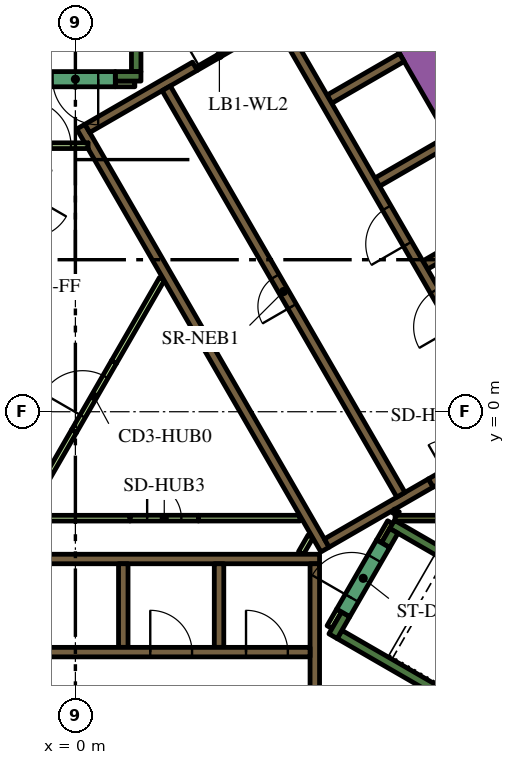
"""IFC4 building model, lengths in metres.
Left out: names, types, materials, properties, quantities, classifications, styles, units other than length and angle.
Written with IfcOpenShell. Run it as: python <this file> out.ifc"""

import sys

from ifc_helpers import new_model, si_unit, direction, frame, frame_2d, origin, place, context, subcontext, project, spatial, polyline, rectangle, outline, extrude, element, fill, save


model = new_model("IFC4")
c1 = context("Model", 3, precision=1e-05, world=origin(), true_north=direction((0.0, 1.0)))
c2 = subcontext(c1, "Body", "Model", "MODEL_VIEW")
j1 = project(units=[si_unit("LENGTHUNIT", "METRE"), si_unit("PLANEANGLEUNIT", "RADIAN")], contexts=[c1])
p1 = place(None, origin())
s1 = spatial("IfcSite", under=j1, at=p1, CompositionType="ELEMENT")
p2 = place(p1, origin())
s2 = spatial("IfcBuilding", under=s1, at=p2, CompositionType="ELEMENT")
p3 = place(p2, frame((0.0, 0.0, 130.5)))
s3 = spatial("IfcBuildingStorey", under=s2, at=p3, CompositionType="ELEMENT", Elevation=130.5)
p4 = place(p3, frame((6.776, 13.364, 0.0), z_axis=(0.0, 0.0, 1.0), x_axis=(0.500004177138, -0.8660229921, 0.0)))
e1 = element("IfcWall", 1, at=p4, inside=s3, PredefinedType="SOLIDWALL", context=c2, shape_type="SweptSolid", body=[
    extrude(rectangle(XDim=20.204, YDim=0.9, at=frame_2d((10.102, 0.0))), origin(), (0.0, 0.0, 1.0), 3.9),
])
p5 = place(p3, frame((12.84, -9.261, 0.0), z_axis=(0.0, 0.0, 1.0), x_axis=(-0.866013990052, 0.500019768644, 0.0)))
e2 = element("IfcWall", 2, at=p5, inside=s3, PredefinedType="SOLIDWALL", context=c2, shape_type="SweptSolid", body=[
    extrude(rectangle(XDim=6.8, YDim=0.25, at=frame_2d((3.4, 0.0))), origin(), (0.0, 0.0, 1.0), 3.9),
])
p6 = place(p3, frame((7.113, -5.33, 0.0), z_axis=(0.0, 0.0, 1.0), x_axis=(-0.499965889992, -0.866045096311, 0.0)))
e3 = element("IfcWall", 3, at=p6, inside=s3, PredefinedType="SOLIDWALL", context=c2, shape_type="SweptSolid", body=[
    extrude(rectangle(XDim=0.666, YDim=0.25, at=frame_2d((0.333, 0.0))), origin(), (0.0, 0.0, 1.0), 3.9),
])
p7 = place(p3, frame((8.334, -2.964, 0.0), z_axis=(0.0, 0.0, 1.0), x_axis=(0.866016039709, -0.500016218704, 0.0)))
e4 = element("IfcWall", 4, at=p7, inside=s3, PredefinedType="SOLIDWALL", context=c2, shape_type="SweptSolid", body=[
    extrude(rectangle(XDim=7.05, YDim=0.25, at=frame_2d((3.525, 0.0))), origin(), (0.0, 0.0, 1.0), 3.9),
])
p8 = place(p3, frame((8.163, -3.511, 0.0), z_axis=(0.0, 0.0, 1.0), x_axis=(0.500127794843, 0.865951608824, 0.0)))
e5 = element("IfcWall", 5, at=p8, inside=s3, PredefinedType="SOLIDWALL", context=c2, shape_type="SweptSolid", body=[
    extrude(rectangle(XDim=0.435, YDim=0.25, at=frame_2d((0.217, 0.0))), origin(), (0.0, 0.0, 1.0), 3.9),
])
p9 = place(p3, frame((1.6, 8.95, 0.0), z_axis=(0.0, 0.0, 1.0), x_axis=(0.0, 1.0, 0.0)))
e6 = element("IfcWall", 6, at=p9, inside=s3, PredefinedType="SOLIDWALL", context=c2, shape_type="SweptSolid", body=[
    extrude(rectangle(XDim=6.8, YDim=0.25, at=frame_2d((3.4, 0.0))), origin(), (0.0, 0.0, 1.0), 3.9),
])
p10 = place(p3, frame((1.05, 8.825, 0.0), z_axis=(0.0, 0.0, 1.0), x_axis=(1.0, 0.0, 0.0)))
e7 = element("IfcWall", 7, at=p10, inside=s3, PredefinedType="SOLIDWALL", context=c2, shape_type="SweptSolid", body=[
    extrude(rectangle(XDim=0.675, YDim=0.25, at=frame_2d((0.337, 0.0))), origin(), (0.0, 0.0, 1.0), 3.9),
])
p11 = place(p3, frame((-6.19, -3.875, 0.0), z_axis=(0.0, 0.0, 1.0), x_axis=(1.0, 0.0, 0.0)))
e8 = element("IfcWall", 8, at=p11, inside=s3, PredefinedType="SOLIDWALL", context=c2, shape_type="SweptSolid", body=[
    extrude(rectangle(XDim=12.615, YDim=0.25, at=frame_2d((6.307, 0.0))), origin(), (0.0, 0.0, 1.0), 3.9),
])
p12 = place(p3, frame((6.3, -7.268, 0.0), z_axis=(0.0, 0.0, 1.0), x_axis=(0.0, 1.0, 0.0)))
e9 = element("IfcWall", 9, at=p12, inside=s3, PredefinedType="SOLIDWALL", context=c2, shape_type="SweptSolid", body=[
    extrude(rectangle(XDim=3.268, YDim=0.25, at=frame_2d((1.634, 0.0))), origin(), (0.0, 0.0, 1.0), 3.9),
])
for number, where, z_axis, x_axis in (
    (10, (3.78, -4.0, 0.0), (0.0, 0.0, 1.0), (0.0, -1.0, 0.0)),
    (11, (1.26, -4.0, 0.0), (0.0, 0.0, 1.0), (0.0, -1.0, 0.0)),
):
    element("IfcWall", number, at=place(p3, frame(where, z_axis=z_axis, x_axis=x_axis)), inside=s3, PredefinedType="SOLIDWALL", context=c2, shape_type="SweptSolid", body=[
        extrude(rectangle(XDim=2.2, YDim=0.25, at=frame_2d((1.1, 0.0))), origin(), (0.0, 0.0, 1.0), 3.9),
    ])
p13 = place(p3, origin())
e12 = element("IfcWall", 12, at=p13, inside=s3, PredefinedType="SOLIDWALL", context=c2, shape_type="SweptSolid", body=[
    extrude(outline(polyline([(0.335, 6.925), (0.335, 7.075), (0.335, 7.075), (0.335, 7.075), (0.245, 7.075), (0.035, 7.439), (0.252, 7.564), (0.377, 7.348), (1.512, 5.382), (1.637, 5.165), (2.221, 4.153), (2.771, 3.199), (2.896, 2.983), (3.138, 2.564), (4.031, 1.017), (4.156, 0.801), (5.292, -1.165), (5.417, -1.382), (6.073, -2.519), (6.552, -3.348), (6.677, -3.564), (6.46, -3.689), (0.332, 6.925), (0.335, 6.925), (0.335, 6.925), (0.335, 6.925)])), origin(), (0.0, 0.0, 1.0), 3.9),
])
p14 = place(p3, frame((0.314, 7.456, 0.0), z_axis=(0.0, 0.0, 1.0), x_axis=(0.866013897511, 0.50001992892, 0.0)))
e13 = element("IfcWall", 13, at=p14, inside=s3, PredefinedType="SOLIDWALL", context=c2, shape_type="SweptSolid", body=[
    extrude(rectangle(XDim=3.268, YDim=0.25, at=frame_2d((1.634, 0.0))), origin(), (0.0, 0.0, 1.0), 3.9),
])
p15 = place(p3, frame((9.352, -1.875, 0.0), z_axis=(0.0, 0.0, 1.0), x_axis=(-0.866024844342, -0.500000968981, 0.0)))
e14 = element("IfcWall", 14, at=p15, inside=s3, PredefinedType="SOLIDWALL", context=c2, shape_type="SweptSolid", body=[
    extrude(rectangle(XDim=3.162, YDim=0.25, at=frame_2d((1.581, 0.0))), origin(), (0.0, 0.0, 1.0), 3.9),
])
for number, where, z_axis, x_axis in (
    (15, (6.684, 8.224, 0.0), (0.0, 0.0, 1.0), (0.866, 0.5, 0.0)),
    (16, (7.944, 6.041, 0.0), (0.0, 0.0, 1.0), (0.866, 0.5, 0.0)),
    (17, (9.204, 3.859, 0.0), (0.0, 0.0, 1.0), (0.866, 0.5, 0.0)),
):
    element("IfcWall", number, at=place(p3, frame(where, z_axis=z_axis, x_axis=x_axis)), inside=s3, PredefinedType="SOLIDWALL", context=c2, shape_type="SweptSolid", body=[
        extrude(rectangle(XDim=2.2, YDim=0.25, at=frame_2d((1.1, 0.0))), origin(), (0.0, 0.0, 1.0), 3.9),
    ])
p16 = place(p3, frame((-6.086, -2.801, 0.0), z_axis=(0.0, 0.0, 1.0), x_axis=(1.0, 0.0, 0.0)))
e18 = element("IfcWall", 18, at=p16, inside=s3, PredefinedType="PARTITIONING", context=c2, shape_type="SweptSolid", body=[
    extrude(rectangle(XDim=7.524, YDim=0.15, at=frame_2d((3.762, 0.0))), origin(), (0.0, 0.0, 1.0), 2.6),
])
p17 = place(p3, frame((-1.208, -2.544, 0.0), z_axis=(0.0, 0.0, 1.0), x_axis=(0.499995339376, 0.86602809458, 0.0)))
e19 = element("IfcWall", 19, at=p17, inside=s3, PredefinedType="PARTITIONING", context=c2, shape_type="SweptSolid", body=[
    extrude(rectangle(XDim=2.349, YDim=0.15, at=frame_2d((1.175, 0.0))), origin(), (0.0, 0.0, 1.0), 2.6),
])
p18 = place(p3, frame((6.688, -5.667, 0.0), z_axis=(0.0, 0.0, 1.0), x_axis=(0.499834152157, 0.86612113491, 0.0)))
e20 = element("IfcWall", 20, at=p18, inside=s3, PredefinedType="PARTITIONING", context=c2, shape_type="SweptSolid", body=[
    extrude(rectangle(XDim=0.505, YDim=0.15, at=frame_2d((0.252, 0.0))), origin(), (0.0, 0.0, 1.0), 2.6),
])
p19 = place(p3, frame((5.936, -3.718, 0.0), z_axis=(0.0, 0.0, 1.0), x_axis=(0.499890179513, 0.866088799389, 0.0)))
e21 = element("IfcWall", 21, at=p19, inside=s3, PredefinedType="PARTITIONING", context=c2, shape_type="SweptSolid", body=[
    extrude(rectangle(XDim=0.504, YDim=0.15, at=frame_2d((0.252, 0.0))), origin(), (0.0, 0.0, 1.0), 2.6),
])
p20 = place(p3, frame((8.412, -2.8, 0.0), z_axis=(0.0, 0.0, 1.0), x_axis=(1.0, 0.0, 0.0)))
e22 = element("IfcWall", 22, at=p20, inside=s3, PredefinedType="PARTITIONING", context=c2, shape_type="SweptSolid", body=[
    extrude(rectangle(XDim=2.702, YDim=0.15, at=frame_2d((1.351, 0.0))), origin(), (0.0, 0.0, 1.0), 3.9),
])
p21 = place(p3, frame((8.459, -2.599, 0.0), z_axis=(0.0, 0.0, 1.0), x_axis=(-0.501919277433, -0.864914469148, 0.0)))
e23 = element("IfcWall", 23, at=p21, inside=s3, PredefinedType="PARTITIONING", context=c2, shape_type="SweptSolid", body=[
    extrude(rectangle(XDim=0.109, YDim=0.15, at=frame_2d((0.054, 0.0))), origin(), (0.0, 0.0, 1.0), 3.9),
])
p22 = place(p3, frame((8.281, -2.907, 0.0), z_axis=(0.0, 0.0, 1.0), x_axis=(-0.500193841991, -0.86591346013, 0.0)))
e24 = element("IfcWall", 24, at=p22, inside=s3, PredefinedType="PARTITIONING", context=c2, shape_type="SweptSolid", body=[
    extrude(rectangle(XDim=0.583, YDim=0.15, at=frame_2d((0.292, 0.0))), origin(), (0.0, 0.0, 1.0), 3.9),
])
p23 = place(p3, frame((3.238, -2.8, 0.0), z_axis=(0.0, 0.0, 1.0), x_axis=(1.0, 0.0, 0.0)))
e25 = element("IfcWall", 25, at=p23, inside=s3, PredefinedType="PARTITIONING", context=c2, shape_type="SweptSolid", body=[
    extrude(rectangle(XDim=2.672, YDim=0.15, at=frame_2d((1.336, 0.0))), origin(), (0.0, 0.0, 1.0), 2.6),
])
p24 = place(p3, frame((1.016, 1.309, 0.0), z_axis=(0.0, 0.0, 1.0), x_axis=(0.49998231768, 0.866035612436, 0.0)))
e26 = element("IfcWall", 26, at=p24, inside=s3, PredefinedType="PARTITIONING", context=c2, shape_type="SweptSolid", body=[
    extrude(rectangle(XDim=2.521, YDim=0.15, at=frame_2d((1.26, 0.0))), origin(), (0.0, 0.0, 1.0), 2.6),
])
p25 = place(p3, frame((1.05, 8.625, 0.0), z_axis=(0.0, 0.0, 1.0), x_axis=(1.0, 0.0, 0.0)))
e27 = element("IfcWall", 27, at=p25, inside=s3, PredefinedType="PARTITIONING", context=c2, shape_type="SweptSolid", body=[
    extrude(rectangle(XDim=0.514, YDim=0.15, at=frame_2d((0.257, 0.0))), origin(), (0.0, 0.0, 1.0), 2.6),
])
p26 = place(p3, frame((-6.175, -6.325, 0.0), z_axis=(0.0, 0.0, 1.0), x_axis=(1.0, 0.0, 0.0)))
e28 = element("IfcWall", 28, at=p26, inside=s3, PredefinedType="SOLIDWALL", context=c2, shape_type="SweptSolid", body=[
    extrude(rectangle(XDim=12.35, YDim=0.25, at=frame_2d((6.175, 0.0))), origin(), (0.0, 0.0, 1.0), 3.9),
])
p27 = place(p26, frame((3.205, 0.0, 0.0)))
e29 = element("IfcOpeningElement", 29, at=p27, cuts=e28, PredefinedType="OPENING", context=c2, shape_type="SweptSolid", body=[
    extrude(rectangle(XDim=0.9, YDim=2.1, at=frame_2d((0.45, 1.05))), frame((0.0, 0.135, 0.0), z_axis=(0.0, -1.0, 0.0), x_axis=(1.0, 0.0, 0.0)), (0.0, 0.0, 1.0), 0.27),
])
p28 = place(p26, frame((8.145, 0.0, 0.0)))
e30 = element("IfcOpeningElement", 30, at=p28, cuts=e28, PredefinedType="OPENING", context=c2, shape_type="SweptSolid", body=[
    extrude(rectangle(XDim=1.1, YDim=2.1, at=frame_2d((0.55, 1.05))), frame((0.0, 0.135, 0.0), z_axis=(0.0, -1.0, 0.0), x_axis=(1.0, 0.0, 0.0)), (0.0, 0.0, 1.0), 0.27),
])
p29 = place(p26, frame((10.665, 0.0, 0.0)))
e31 = element("IfcOpeningElement", 31, at=p29, cuts=e28, PredefinedType="OPENING", context=c2, shape_type="SweptSolid", body=[
    extrude(rectangle(XDim=1.1, YDim=2.1, at=frame_2d((0.55, 1.05))), frame((0.0, 0.135, 0.0), z_axis=(0.0, -1.0, 0.0), x_axis=(1.0, 0.0, 0.0)), (0.0, 0.0, 1.0), 0.27),
])
p30 = place(p3, frame((11.553, -0.46, 0.0), z_axis=(0.0, 0.0, 1.0), x_axis=(-0.500006514828, 0.866021642414, 0.0)))
e32 = element("IfcWall", 32, at=p30, inside=s3, PredefinedType="SOLIDWALL", context=c2, shape_type="SweptSolid", body=[
    extrude(rectangle(XDim=12.35, YDim=0.25, at=frame_2d((6.175, 0.0))), origin(), (0.0, 0.0, 1.0), 3.9),
])
p31 = place(p30, frame((0.585, 0.0, 0.0)))
e33 = element("IfcOpeningElement", 33, at=p31, cuts=e32, PredefinedType="OPENING", context=c2, shape_type="SweptSolid", body=[
    extrude(rectangle(XDim=1.1, YDim=2.1, at=frame_2d((0.55, 1.05))), frame((0.0, 0.135, 0.0), z_axis=(0.0, -1.0, 0.0), x_axis=(1.0, 0.0, 0.0)), (0.0, 0.0, 1.0), 0.27),
])
p32 = place(p30, frame((3.105, 0.0, 0.0)))
e34 = element("IfcOpeningElement", 34, at=p32, cuts=e32, PredefinedType="OPENING", context=c2, shape_type="SweptSolid", body=[
    extrude(rectangle(XDim=1.1, YDim=2.1, at=frame_2d((0.55, 1.05))), frame((0.0, 0.135, 0.0), z_axis=(0.0, -1.0, 0.0), x_axis=(1.0, 0.0, 0.0)), (0.0, 0.0, 1.0), 0.27),
])
p33 = place(p30, frame((5.625, 0.0, 0.0)))
e35 = element("IfcOpeningElement", 35, at=p33, cuts=e32, PredefinedType="OPENING", context=c2, shape_type="SweptSolid", body=[
    extrude(rectangle(XDim=1.1, YDim=2.1, at=frame_2d((0.55, 1.05))), frame((0.0, 0.135, 0.0), z_axis=(0.0, -1.0, 0.0), x_axis=(1.0, 0.0, 0.0)), (0.0, 0.0, 1.0), 0.27),
])
p34 = place(p3, frame((8.565, -2.185, 0.0), z_axis=(0.0, 0.0, 1.0), x_axis=(-0.499997954832, 0.866026584559, 0.0)))
e36 = element("IfcWall", 36, at=p34, inside=s3, PredefinedType="SOLIDWALL", context=c2, shape_type="SweptSolid", body=[
    extrude(rectangle(XDim=12.35, YDim=0.25, at=frame_2d((6.175, 0.0))), origin(), (0.0, 0.0, 1.0), 3.9),
])
p35 = place(p34, frame((5.725, 0.0, 0.0)))
e37 = element("IfcOpeningElement", 37, at=p35, cuts=e36, PredefinedType="OPENING", context=c2, shape_type="SweptSolid", body=[
    extrude(rectangle(XDim=0.9, YDim=2.1, at=frame_2d((0.45, 1.05))), frame((0.0, 0.135, 0.0), z_axis=(0.0, -1.0, 0.0), x_axis=(1.0, 0.0, 0.0)), (0.0, 0.0, 1.0), 0.27),
])
p36 = place(p3, frame((7.048, -5.292, 0.0), z_axis=(0.0, 0.0, 1.0), x_axis=(0.49994051562, 0.866059744384, 0.0)))
e38 = element("IfcWall", 38, at=p36, inside=s3, PredefinedType="SOLIDWALL", context=c2, shape_type="SweptSolid", body=[
    extrude(rectangle(XDim=2.1, YDim=0.4, at=frame_2d((1.05, 0.0))), origin(), (0.0, 0.0, 1.0), 3.9),
])
p37 = place(p36, frame((0.45, 0.0, 0.0)))
e39 = element("IfcOpeningElement", 39, at=p37, cuts=e38, PredefinedType="OPENING", context=c2, shape_type="SweptSolid", body=[
    extrude(rectangle(XDim=1.2, YDim=2.1, at=frame_2d((0.6, 1.05))), frame((0.0, 0.21, 0.0), z_axis=(0.0, -1.0, 0.0), x_axis=(1.0, 0.0, 0.0)), (0.0, 0.0, 1.0), 0.42),
])
p38 = place(p3, frame((1.05, 8.75, 0.0), z_axis=(0.0, 0.0, 1.0), x_axis=(-1.0, 0.0, 0.0)))
e40 = element("IfcWall", 40, at=p38, inside=s3, PredefinedType="SOLIDWALL", context=c2, shape_type="SweptSolid", body=[
    extrude(rectangle(XDim=2.1, YDim=0.4, at=frame_2d((1.05, 0.0))), origin(), (0.0, 0.0, 1.0), 3.9),
])
p39 = place(p38, frame((0.45, 0.0, 0.0)))
e41 = element("IfcOpeningElement", 41, at=p39, cuts=e40, PredefinedType="OPENING", context=c2, shape_type="SweptSolid", body=[
    extrude(rectangle(XDim=1.2, YDim=2.1, at=frame_2d((0.6, 1.05))), frame((0.0, 0.21, 0.0), z_axis=(0.0, -1.0, 0.0), x_axis=(1.0, 0.0, 0.0)), (0.0, 0.0, 1.0), 0.42),
])
p40 = place(p3, frame((-1.765, 7.0, 0.0), z_axis=(0.0, 0.0, 1.0), x_axis=(1.0, 0.0, 0.0)))
e42 = element("IfcWall", 42, at=p40, inside=s3, PredefinedType="PARTITIONING", context=c2, shape_type="SweptSolid", body=[
    extrude(rectangle(XDim=2.1, YDim=0.15, at=frame_2d((1.05, 0.0))), origin(), (0.0, 0.0, 1.0), 2.6),
])
p41 = place(p40, frame((0.45, 0.0, 0.0)))
e43 = element("IfcOpeningElement", 43, at=p41, cuts=e42, PredefinedType="OPENING", context=c2, shape_type="SweptSolid", body=[
    extrude(rectangle(XDim=1.2, YDim=2.1, at=frame_2d((0.6, 1.05))), frame((0.0, 0.085, 0.0), z_axis=(0.0, -1.0, 0.0), x_axis=(1.0, 0.0, 0.0)), (0.0, 0.0, 1.0), 0.17),
])
p42 = place(p3, frame((-0.034, -0.509, 0.0), z_axis=(0.0, 0.0, 1.0), x_axis=(0.49994051562, 0.866059744384, 0.0)))
e44 = element("IfcWall", 44, at=p42, inside=s3, PredefinedType="PARTITIONING", context=c2, shape_type="SweptSolid", body=[
    extrude(rectangle(XDim=2.1, YDim=0.15, at=frame_2d((1.05, 0.0))), origin(), (0.0, 0.0, 1.0), 2.6),
])
p43 = place(p42, frame((0.45, 0.0, 0.0)))
e45 = element("IfcOpeningElement", 45, at=p43, cuts=e44, PredefinedType="OPENING", context=c2, shape_type="SweptSolid", body=[
    extrude(rectangle(XDim=1.2, YDim=2.1, at=frame_2d((0.6, 1.05))), frame((0.0, 0.085, 0.0), z_axis=(0.0, -1.0, 0.0), x_axis=(1.0, 0.0, 0.0)), (0.0, 0.0, 1.0), 0.17),
])
p44 = place(p3, frame((3.183, 9.02, 0.0), z_axis=(0.0, 0.0, 1.0), x_axis=(0.866034573852, 0.49998411664, 0.0)))
e46 = element("IfcWall", 46, at=p44, inside=s3, PredefinedType="PARTITIONING", context=c2, shape_type="SweptSolid", body=[
    extrude(rectangle(XDim=1.4, YDim=0.09, at=frame_2d((0.7, 0.0))), origin(), (0.0, 0.0, 1.0), 2.6),
])
p45 = place(p44, frame((0.1, 0.0, 0.0)))
e47 = element("IfcOpeningElement", 47, at=p45, cuts=e46, PredefinedType="OPENING", context=c2, shape_type="SweptSolid", body=[
    extrude(rectangle(XDim=1.2, YDim=2.1, at=frame_2d((0.6, 1.05))), frame((0.0, 0.055, 0.0), z_axis=(0.0, -1.0, 0.0), x_axis=(1.0, 0.0, 0.0)), (0.0, 0.0, 1.0), 0.11),
])
p46 = place(p3, frame((9.352, -1.875, 0.0), z_axis=(0.0, 0.0, 1.0), x_axis=(0.865989075817, 0.500062916607, 0.0)))
e48 = element("IfcWall", 48, at=p46, inside=s3, PredefinedType="SOLIDWALL", context=c2, shape_type="SweptSolid", body=[
    extrude(rectangle(XDim=1.8, YDim=0.25, at=frame_2d((0.9, 0.0))), origin(), (0.0, 0.0, 1.0), 3.9),
])
p47 = place(p46, frame((0.45, 0.0, 0.0)))
e49 = element("IfcOpeningElement", 49, at=p47, cuts=e48, PredefinedType="OPENING", context=c2, shape_type="SweptSolid", body=[
    extrude(rectangle(XDim=0.9, YDim=2.1, at=frame_2d((0.45, 1.05))), frame((0.0, 0.135, 0.0), z_axis=(0.0, -1.0, 0.0), x_axis=(1.0, 0.0, 0.0)), (0.0, 0.0, 1.0), 0.27),
])
p48 = place(p3, frame((1.438, -2.8, 0.0), z_axis=(0.0, 0.0, 1.0), x_axis=(1.0, 0.0, 0.0)))
e50 = element("IfcWall", 50, at=p48, inside=s3, PredefinedType="PARTITIONING", context=c2, shape_type="SweptSolid", body=[
    extrude(rectangle(XDim=1.8, YDim=0.15, at=frame_2d((0.9, 0.0))), origin(), (0.0, 0.0, 1.0), 2.6),
])
p49 = place(p48, frame((0.45, 0.0, 0.0)))
e51 = element("IfcOpeningElement", 51, at=p49, cuts=e50, PredefinedType="OPENING", context=c2, shape_type="SweptSolid", body=[
    extrude(rectangle(XDim=0.9, YDim=2.1, at=frame_2d((0.45, 1.05))), frame((0.0, 0.085, 0.0), z_axis=(0.0, -1.0, 0.0), x_axis=(1.0, 0.0, 0.0)), (0.0, 0.0, 1.0), 0.17),
])
p50 = place(p3, frame((6.163, 18.475, 0.0), z_axis=(0.0, 0.0, 1.0), x_axis=(0.500001317485, -0.866024643133, 0.0)))
e52 = element("IfcWall", 52, at=p50, inside=s3, PredefinedType="PARTITIONING", context=c2, shape_type="SweptSolid", body=[
    extrude(rectangle(XDim=25.767, YDim=0.15, at=frame_2d((12.883, 0.0))), origin(), (0.0, 0.0, 1.0), 2.6),
])
p51 = place(p50, frame((21.774, 0.0, 0.0)))
e53 = element("IfcOpeningElement", 53, at=p51, cuts=e52, PredefinedType="OPENING", context=c2, shape_type="SweptSolid", body=[
    extrude(rectangle(XDim=1.0, YDim=2.1, at=frame_2d((0.5, 1.05))), frame((0.0, 0.085, 0.0), z_axis=(0.0, -1.0, 0.0), x_axis=(1.0, 0.0, 0.0)), (0.0, 0.0, 1.0), 0.17),
])
p52 = place(p50, frame((15.571, 0.0, 0.0)))
e54 = element("IfcOpeningElement", 54, at=p52, cuts=e52, PredefinedType="OPENING", context=c2, shape_type="SweptSolid", body=[
    extrude(rectangle(XDim=1.0, YDim=2.1, at=frame_2d((0.5, 1.05))), frame((0.0, 0.085, 0.0), z_axis=(0.0, -1.0, 0.0), x_axis=(1.0, 0.0, 0.0)), (0.0, 0.0, 1.0), 0.17),
])
p53 = place(p50, frame((9.265, 0.0, 0.0)))
e55 = element("IfcOpeningElement", 55, at=p53, cuts=e52, PredefinedType="OPENING", context=c2, shape_type="SweptSolid", body=[
    extrude(rectangle(XDim=1.0, YDim=2.1, at=frame_2d((0.5, 1.05))), frame((0.0, 0.085, 0.0), z_axis=(0.0, -1.0, 0.0), x_axis=(1.0, 0.0, 0.0)), (0.0, 0.0, 1.0), 0.17),
])
p54 = place(p50, frame((3.063, 0.0, 0.0)))
e56 = element("IfcOpeningElement", 56, at=p54, cuts=e52, PredefinedType="OPENING", context=c2, shape_type="SweptSolid", body=[
    extrude(rectangle(XDim=1.0, YDim=2.1, at=frame_2d((0.5, 1.05))), frame((0.0, 0.085, 0.0), z_axis=(0.0, -1.0, 0.0), x_axis=(1.0, 0.0, 0.0)), (0.0, 0.0, 1.0), 0.17),
])
p55 = place(p28, origin())
e57 = element("IfcDoor", 57, at=p55, inside=s3, OperationType="DOUBLE_DOOR_SLIDING", PredefinedType="DOOR", context=c2, shape_type="SweptSolid", body=[
    extrude(rectangle(XDim=1.1, YDim=2.1, at=frame_2d((0.55, 1.05))), frame((0.0, 0.025, 0.0), z_axis=(0.0, -1.0, 0.0), x_axis=(1.0, 0.0, 0.0)), (0.0, 0.0, 1.0), 0.05),
])
fill(e30, e57)
p56 = place(p29, origin())
e58 = element("IfcDoor", 58, at=p56, inside=s3, OperationType="DOUBLE_DOOR_SLIDING", PredefinedType="DOOR", context=c2, shape_type="SweptSolid", body=[
    extrude(rectangle(XDim=1.1, YDim=2.1, at=frame_2d((0.55, 1.05))), frame((0.0, 0.025, 0.0), z_axis=(0.0, -1.0, 0.0), x_axis=(1.0, 0.0, 0.0)), (0.0, 0.0, 1.0), 0.05),
])
fill(e31, e58)
p57 = place(p32, origin())
e59 = element("IfcDoor", 59, at=p57, inside=s3, OperationType="DOUBLE_DOOR_SLIDING", PredefinedType="DOOR", context=c2, shape_type="SweptSolid", body=[
    extrude(rectangle(XDim=1.1, YDim=2.1, at=frame_2d((0.55, 1.05))), frame((0.0, 0.025, 0.0), z_axis=(0.0, -1.0, 0.0), x_axis=(1.0, 0.0, 0.0)), (0.0, 0.0, 1.0), 0.05),
])
fill(e34, e59)
p58 = place(p33, origin())
e60 = element("IfcDoor", 60, at=p58, inside=s3, OperationType="DOUBLE_DOOR_SLIDING", PredefinedType="DOOR", context=c2, shape_type="SweptSolid", body=[
    extrude(rectangle(XDim=1.1, YDim=2.1, at=frame_2d((0.55, 1.05))), frame((0.0, 0.025, 0.0), z_axis=(0.0, -1.0, 0.0), x_axis=(1.0, 0.0, 0.0)), (0.0, 0.0, 1.0), 0.05),
])
fill(e35, e60)
p59 = place(p35, origin())
e61 = element("IfcDoor", 61, at=p59, inside=s3, OperationType="SINGLE_SWING_LEFT", PredefinedType="DOOR", context=c2, shape_type="SweptSolid", body=[
    extrude(rectangle(XDim=0.9, YDim=2.1, at=frame_2d((0.45, 1.05))), frame((0.0, 0.025, 0.0), z_axis=(0.0, -1.0, 0.0), x_axis=(1.0, 0.0, 0.0)), (0.0, 0.0, 1.0), 0.05),
])
fill(e37, e61)
p60 = place(p37, origin())
e62 = element("IfcDoor", 62, at=p60, inside=s3, OperationType="SINGLE_SWING_LEFT", PredefinedType="DOOR", context=c2, shape_type="SweptSolid", body=[
    extrude(rectangle(XDim=1.2, YDim=2.1, at=frame_2d((0.6, 1.05))), frame((0.0, 0.025, 0.0), z_axis=(0.0, -1.0, 0.0), x_axis=(1.0, 0.0, 0.0)), (0.0, 0.0, 1.0), 0.05),
])
fill(e39, e62)
p61 = place(p39, origin())
e63 = element("IfcDoor", 63, at=p61, inside=s3, OperationType="SINGLE_SWING_LEFT", PredefinedType="DOOR", context=c2, shape_type="SweptSolid", body=[
    extrude(rectangle(XDim=1.2, YDim=2.1, at=frame_2d((0.6, 1.05))), frame((0.0, 0.025, 0.0), z_axis=(0.0, -1.0, 0.0), x_axis=(1.0, 0.0, 0.0)), (0.0, 0.0, 1.0), 0.05),
])
fill(e41, e63)
p62 = place(p41, origin())
e64 = element("IfcDoor", 64, at=p62, inside=s3, OperationType="SINGLE_SWING_LEFT", PredefinedType="DOOR", context=c2, shape_type="SweptSolid", body=[
    extrude(rectangle(XDim=1.2, YDim=2.1, at=frame_2d((0.6, 1.05))), frame((0.0, 0.025, 0.0), z_axis=(0.0, -1.0, 0.0), x_axis=(1.0, 0.0, 0.0)), (0.0, 0.0, 1.0), 0.05),
])
fill(e43, e64)
p63 = place(p43, origin())
e65 = element("IfcDoor", 65, at=p63, inside=s3, OperationType="SINGLE_SWING_LEFT", PredefinedType="DOOR", context=c2, shape_type="SweptSolid", body=[
    extrude(rectangle(XDim=1.2, YDim=2.1, at=frame_2d((0.6, 1.05))), frame((0.0, 0.025, 0.0), z_axis=(0.0, -1.0, 0.0), x_axis=(1.0, 0.0, 0.0)), (0.0, 0.0, 1.0), 0.05),
])
fill(e45, e65)
p64 = place(p45, origin())
e66 = element("IfcDoor", 66, at=p64, inside=s3, OperationType="SINGLE_SWING_LEFT", PredefinedType="DOOR", context=c2, shape_type="SweptSolid", body=[
    extrude(rectangle(XDim=1.2, YDim=2.1, at=frame_2d((0.6, 1.05))), frame((0.0, 0.025, 0.0), z_axis=(0.0, -1.0, 0.0), x_axis=(1.0, 0.0, 0.0)), (0.0, 0.0, 1.0), 0.05),
])
fill(e47, e66)
p65 = place(p49, origin())
e67 = element("IfcDoor", 67, at=p65, inside=s3, OperationType="SINGLE_SWING_LEFT", PredefinedType="DOOR", context=c2, shape_type="SweptSolid", body=[
    extrude(rectangle(XDim=0.9, YDim=2.1, at=frame_2d((0.45, 1.05))), frame((0.0, 0.025, 0.0), z_axis=(0.0, -1.0, 0.0), x_axis=(1.0, 0.0, 0.0)), (0.0, 0.0, 1.0), 0.05),
])
fill(e51, e67)
save(model, sys.argv[1])
